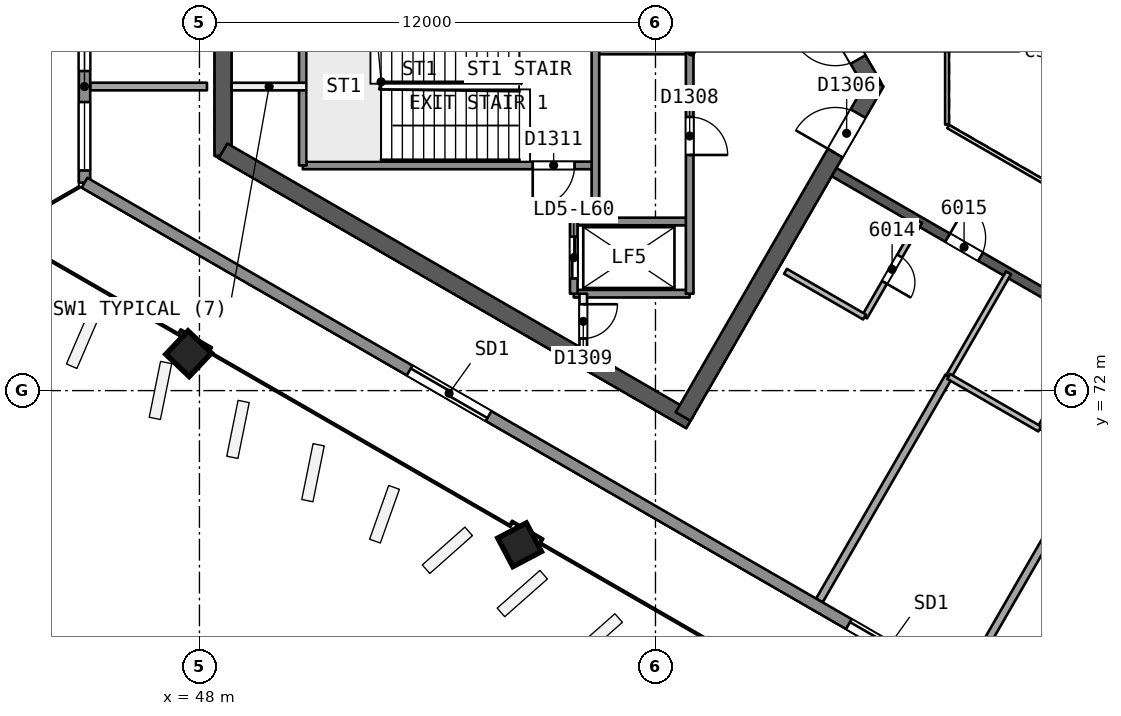
"""IFC4 building model, lengths in metres.
Left out: names, types, materials, properties, quantities, classifications, styles, units other than length and angle.
Written with IfcOpenShell. Run it as: python <this file> out.ifc"""

import sys

from ifc_helpers import new_model, si_unit, direction, frame, frame_2d, origin, origin_2d, place, context, subcontext, project, spatial, rectangle, extrude, element, fill, save


model = new_model("IFC4")
c1 = context("Model", 3, precision=1e-05, world=origin(), true_north=direction((0.0, 1.0)))
c2 = subcontext(c1, "Body", "Model", "MODEL_VIEW")
j1 = project(units=[si_unit("LENGTHUNIT", "METRE"), si_unit("PLANEANGLEUNIT", "RADIAN")], contexts=[c1])
p1 = place(None, origin())
s1 = spatial("IfcSite", under=j1, at=p1, CompositionType="ELEMENT")
p2 = place(p1, origin())
s2 = spatial("IfcBuilding", under=s1, at=p2, CompositionType="ELEMENT")
p3 = place(p2, frame((0.0, 0.0, 242.8)))
s3 = spatial("IfcBuildingStorey", under=s2, at=p3, CompositionType="ELEMENT", Elevation=242.8)
p4 = place(p3, frame((65.74, 80.0, 0.0), z_axis=(0.0, 0.0, 1.0), x_axis=(-0.499991857942, 0.866030104553, 0.0)))
e1 = element("IfcWall", 1, at=p4, inside=s3, PredefinedType="SHEAR", context=c2, shape_type="SweptSolid", body=[
    extrude(rectangle(XDim=10.25, YDim=0.45, at=frame_2d((5.125, 0.0))), origin(), (0.0, 0.0, 1.0), 3.7),
])
p5 = place(p4, frame((0.82, 0.0, 0.0)))
e2 = element("IfcOpeningElement", 2, at=p5, cuts=e1, PredefinedType="OPENING", context=c2, shape_type="SweptSolid", body=[
    extrude(rectangle(XDim=1.2, YDim=2.1, at=frame_2d((0.6, 1.05))), frame((0.0, 0.235, 0.0), z_axis=(0.0, -1.0, 0.0), x_axis=(1.0, 0.0, 0.0)), (0.0, 0.0, 1.0), 0.471),
])
p6 = place(p3, frame((48.622, 81.693, 0.0), z_axis=(0.0, 0.0, 1.0), x_axis=(0.0, -1.0, 0.0)))
e3 = element("IfcWall", 3, at=p6, inside=s3, PredefinedType="SHEAR", context=c2, shape_type="SweptSolid", body=[
    extrude(rectangle(XDim=3.515, YDim=0.45, at=frame_2d((1.758, 0.0))), origin(), (0.0, 0.0, 1.0), 3.7),
])
p7 = place(p3, frame((48.622, 78.307, 0.0), z_axis=(0.0, 0.0, 1.0), x_axis=(0.86602701116, -0.499997215934, 0.0)))
e4 = element("IfcWall", 4, at=p7, inside=s3, PredefinedType="SHEAR", context=c2, shape_type="SweptSolid", body=[
    extrude(rectangle(XDim=14.204, YDim=0.45, at=frame_2d((7.102, 0.0))), origin(), (0.0, 0.0, 1.0), 3.7),
])
p8 = place(p3, frame((60.728, 71.318, 0.0), z_axis=(0.0, 0.0, 1.0), x_axis=(0.500012416173, 0.866018235185, 0.0)))
e5 = element("IfcWall", 5, at=p8, inside=s3, PredefinedType="SHEAR", context=c2, shape_type="SweptSolid", body=[
    extrude(rectangle(XDim=10.155, YDim=0.45, at=frame_2d((5.078, 0.0))), origin(), (0.0, 0.0, 1.0), 3.7),
])
p9 = place(p8, frame((8.005, 0.0, 0.0)))
e6 = element("IfcOpeningElement", 6, at=p9, cuts=e5, PredefinedType="OPENING", context=c2, shape_type="SweptSolid", body=[
    extrude(rectangle(XDim=1.2, YDim=2.1, at=frame_2d((0.6, 1.05))), frame((0.0, 0.235, 0.0), z_axis=(0.0, -1.0, 0.0), x_axis=(1.0, 0.0, 0.0)), (0.0, 0.0, 1.0), 0.471),
])
p10 = place(p3, frame((64.7, 77.748, 0.0), z_axis=(0.0, 0.0, 1.0), x_axis=(0.866026492143, -0.499998114903, 0.0)))
e7 = element("IfcWall", 7, at=p10, inside=s3, PredefinedType="SHEAR", context=c2, shape_type="SweptSolid", body=[
    extrude(rectangle(XDim=15.588, YDim=0.25, at=frame_2d((7.794, 0.0))), origin(), (0.0, 0.0, 1.0), 3.35),
])
p11 = place(p10, frame((3.45, 0.0, 0.0)))
e8 = element("IfcOpeningElement", 8, at=p11, cuts=e7, PredefinedType="OPENING", context=c2, shape_type="SweptSolid", body=[
    extrude(rectangle(XDim=1.0, YDim=2.1, at=frame_2d((0.5, 1.05))), frame((0.0, 0.135, 0.0), z_axis=(0.0, -1.0, 0.0), x_axis=(1.0, 0.0, 0.0)), (0.0, 0.0, 1.0), 0.271),
])
p12 = place(p10, frame((8.315, 0.0, 0.0)))
e9 = element("IfcOpeningElement", 9, at=p12, cuts=e7, PredefinedType="OPENING", context=c2, shape_type="SweptSolid", body=[
    extrude(rectangle(XDim=1.1, YDim=2.1, at=frame_2d((0.55, 1.05))), frame((0.0, 0.135, 0.0), z_axis=(0.0, -1.0, 0.0), x_axis=(1.0, 0.0, 0.0)), (0.0, 0.0, 1.0), 0.271),
])
p13 = place(p10, frame((10.827, 0.0, 0.0)))
e10 = element("IfcOpeningElement", 10, at=p13, cuts=e7, PredefinedType="OPENING", context=c2, shape_type="SweptSolid", body=[
    extrude(rectangle(XDim=1.0, YDim=2.1, at=frame_2d((0.5, 1.05))), frame((0.0, 0.135, 0.0), z_axis=(0.0, -1.0, 0.0), x_axis=(1.0, 0.0, 0.0)), (0.0, 0.0, 1.0), 0.271),
])
p14 = place(p3, frame((47.68, 72.963, 0.0), z_axis=(0.028493212074, 0.006793520471, 0.999570900409), x_axis=(-0.865580919578, 0.50031701382, 0.021273395238)))
e11 = element("IfcColumn", 11, at=p14, inside=s3, PredefinedType="COLUMN", context=c2, shape_type="SweptSolid", body=[
    extrude(rectangle(XDim=0.85, YDim=0.85, at=origin_2d()), origin(), (0.0, 0.0, 1.0), 3.702),
])
p15 = place(p3, frame((56.402, 67.928, 0.0), z_axis=(0.019328516974, 0.012138044789, 0.999739504221), x_axis=(-0.865685889808, 0.500474070789, 0.010660424724)))
e12 = element("IfcColumn", 12, at=p15, inside=s3, PredefinedType="COLUMN", context=c2, shape_type="SweptSolid", body=[
    extrude(rectangle(XDim=0.85, YDim=0.85, at=origin_2d()), origin(), (0.0, 0.0, 1.0), 3.701),
])
p16 = place(p3, frame((45.124, 80.001, 0.0), z_axis=(0.0, 0.0, 1.0), x_axis=(1.0, 0.0, 0.0)))
e13 = element("IfcWall", 13, at=p16, inside=s3, PredefinedType="PARTITIONING", context=c2, shape_type="SweptSolid", body=[
    extrude(rectangle(XDim=3.074, YDim=0.2, at=frame_2d((1.537, 0.0))), origin(), (0.0, 0.0, 1.0), 3.35),
])
p17 = place(p3, frame((66.952, 76.448, 0.0), z_axis=(0.0, 0.0, 1.0), x_axis=(-0.499987231761, -0.866032775405, 0.0)))
e14 = element("IfcWall", 14, at=p17, inside=s3, PredefinedType="PARTITIONING", context=c2, shape_type="SweptSolid", body=[
    extrude(rectangle(XDim=2.9, YDim=0.15, at=frame_2d((1.45, 0.0))), origin(), (0.0, 0.0, 1.0), 3.35),
])
p18 = place(p17, frame((1.05, 0.0, 0.0)))
e15 = element("IfcOpeningElement", 15, at=p18, cuts=e14, PredefinedType="OPENING", context=c2, shape_type="SweptSolid", body=[
    extrude(rectangle(XDim=0.8, YDim=2.1, at=frame_2d((0.4, 1.05))), frame((0.0, 0.085, 0.0), z_axis=(0.0, -1.0, 0.0), x_axis=(1.0, 0.0, 0.0)), (0.0, 0.0, 1.0), 0.171),
])
p19 = place(p3, frame((65.502, 73.937, 0.0), z_axis=(0.0, 0.0, 1.0), x_axis=(-0.865994240961, 0.500053971709, 0.0)))
e16 = element("IfcWall", 16, at=p19, inside=s3, PredefinedType="PARTITIONING", context=c2, shape_type="SweptSolid", body=[
    extrude(rectangle(XDim=2.401, YDim=0.15, at=frame_2d((1.201, 0.0))), origin(), (0.0, 0.0, 1.0), 3.35),
])
p20 = place(p3, frame((64.312, 66.477, 0.0), z_axis=(0.0, 0.0, 1.0), x_axis=(0.500015286268, 0.866016578074, 0.0)))
e17 = element("IfcWall", 17, at=p20, inside=s3, PredefinedType="PARTITIONING", context=c2, shape_type="SweptSolid", body=[
    extrude(rectangle(XDim=6.808, YDim=0.2, at=frame_2d((3.404, 0.0))), origin(), (0.0, 0.0, 1.0), 3.35),
])
p21 = place(p3, frame((67.717, 72.373, 0.0), z_axis=(0.0, 0.0, 1.0), x_axis=(0.500002266011, 0.866024095498, 0.0)))
e18 = element("IfcWall", 18, at=p21, inside=s3, PredefinedType="PARTITIONING", context=c2, shape_type="SweptSolid", body=[
    extrude(rectangle(XDim=3.147, YDim=0.15, at=frame_2d((1.573, 0.0))), origin(), (0.0, 0.0, 1.0), 3.35),
])
p22 = place(p3, frame((71.684, 73.716, 0.0), z_axis=(0.0, 0.0, 1.0), x_axis=(-0.499977671647, -0.866038294681, 0.0)))
e19 = element("IfcWall", 19, at=p22, inside=s3, PredefinedType="PARTITIONING", context=c2, shape_type="SweptSolid", body=[
    extrude(rectangle(XDim=3.147, YDim=0.15, at=frame_2d((1.573, 0.0))), origin(), (0.0, 0.0, 1.0), 3.35),
])
p23 = place(p22, frame((1.123, 0.0, 0.0)))
e20 = element("IfcOpeningElement", 20, at=p23, cuts=e19, PredefinedType="OPENING", context=c2, shape_type="SweptSolid", body=[
    extrude(rectangle(XDim=0.9, YDim=2.1, at=frame_2d((0.45, 1.05))), frame((0.0, 0.085, 0.0), z_axis=(0.0, -1.0, 0.0), x_axis=(1.0, 0.0, 0.0)), (0.0, 0.0, 1.0), 0.171),
])
p24 = place(p3, frame((70.111, 70.991, 0.0), z_axis=(0.0, 0.0, 1.0), x_axis=(-0.866050310653, 0.499956857557, 0.0)))
e21 = element("IfcWall", 21, at=p24, inside=s3, PredefinedType="PARTITIONING", context=c2, shape_type="SweptSolid", body=[
    extrude(rectangle(XDim=2.765, YDim=0.15, at=frame_2d((1.382, 0.0))), origin(), (0.0, 0.0, 1.0), 3.35),
])
p25 = place(p3, frame((68.093, 64.295, 0.0), z_axis=(0.0, 0.0, 1.0), x_axis=(0.500011170278, 0.866018954525, 0.0)))
e22 = element("IfcWall", 22, at=p25, inside=s3, PredefinedType="PARTITIONING", context=c2, shape_type="SweptSolid", body=[
    extrude(rectangle(XDim=9.955, YDim=0.2, at=frame_2d((4.978, 0.0))), origin(), (0.0, 0.0, 1.0), 3.35),
])
p26 = place(p3, frame((44.975, 77.469, 0.0), z_axis=(0.0, 0.0, 1.0), x_axis=(0.0, 1.0, 0.0)))
e23 = element("IfcWall", 23, at=p26, inside=s3, PredefinedType="SOLIDWALL", context=c2, shape_type="SweptSolid", body=[
    extrude(rectangle(XDim=5.061, YDim=0.3, at=frame_2d((2.531, 0.0))), origin(), (0.0, 0.0, 1.0), 3.35),
])
p27 = place(p26, frame((2.938, 0.0, 0.9)))
e24 = element("IfcOpeningElement", 24, at=p27, cuts=e23, PredefinedType="OPENING", context=c2, shape_type="SweptSolid", body=[
    extrude(rectangle(XDim=1.8, YDim=1.5, at=frame_2d((0.9, 0.75))), frame((0.0, 0.161, 0.0), z_axis=(0.0, -1.0, 0.0), x_axis=(1.0, 0.0, 0.0)), (0.0, 0.0, 1.0), 0.321),
])
p28 = place(p26, frame((0.323, 0.0, 0.9)))
e25 = element("IfcOpeningElement", 25, at=p28, cuts=e23, PredefinedType="OPENING", context=c2, shape_type="SweptSolid", body=[
    extrude(rectangle(XDim=1.8, YDim=1.5, at=frame_2d((0.9, 0.75))), frame((0.0, 0.161, 0.0), z_axis=(0.0, -1.0, 0.0), x_axis=(1.0, 0.0, 0.0)), (0.0, 0.0, 1.0), 0.321),
])
p29 = place(p3, frame((87.821, 52.733, 0.0), z_axis=(0.0, 0.0, 1.0), x_axis=(-0.866025586464, 0.49999968359, 0.0)))
e26 = element("IfcWall", 26, at=p29, inside=s3, PredefinedType="SOLIDWALL", context=c2, shape_type="SweptSolid", body=[
    extrude(rectangle(XDim=49.474, YDim=0.3, at=frame_2d((24.737, 0.0))), origin(), (0.0, 0.0, 1.0), 3.35),
])
p30 = place(p29, frame((23.849, 0.0, 0.0)))
e27 = element("IfcOpeningElement", 27, at=p30, cuts=e26, PredefinedType="OPENING", context=c2, shape_type="SweptSolid", body=[
    extrude(rectangle(XDim=2.4, YDim=2.4, at=frame_2d((1.2, 1.2))), frame((0.0, 0.161, 0.0), z_axis=(0.0, -1.0, 0.0), x_axis=(1.0, 0.0, 0.0)), (0.0, 0.0, 1.0), 0.321),
])
p31 = place(p29, frame((37.196, 0.0, 0.0)))
e28 = element("IfcOpeningElement", 28, at=p31, cuts=e26, PredefinedType="OPENING", context=c2, shape_type="SweptSolid", body=[
    extrude(rectangle(XDim=2.4, YDim=2.4, at=frame_2d((1.2, 1.2))), frame((0.0, 0.161, 0.0), z_axis=(0.0, -1.0, 0.0), x_axis=(1.0, 0.0, 0.0)), (0.0, 0.0, 1.0), 0.321),
])
p32 = place(p29, frame((10.19, 0.0, 0.0)))
e29 = element("IfcOpeningElement", 29, at=p32, cuts=e26, PredefinedType="OPENING", context=c2, shape_type="SweptSolid", body=[
    extrude(rectangle(XDim=2.4, YDim=2.4, at=frame_2d((1.2, 1.2))), frame((0.0, 0.161, 0.0), z_axis=(0.0, -1.0, 0.0), x_axis=(1.0, 0.0, 0.0)), (0.0, 0.0, 1.0), 0.321),
])
p33 = place(p3, frame((60.9, 80.95, 0.0), z_axis=(0.0, 0.0, 1.0), x_axis=(-1.0, 0.0, 0.0)))
e30 = element("IfcWall", 30, at=p33, inside=s3, PredefinedType="SOLIDWALL", context=c2, shape_type="SweptSolid", body=[
    extrude(rectangle(XDim=2.48, YDim=0.2, at=frame_2d((1.24, 0.0))), origin(), (0.0, 0.0, 1.0), 3.35),
])
p34 = place(p3, frame((50.82, 80.0, 0.0), z_axis=(0.0, 0.0, 1.0), x_axis=(-1.0, 0.0, 0.0)))
e31 = element("IfcWall", 31, at=p34, inside=s3, PredefinedType="PARTITIONING", context=c2, shape_type="SweptSolid", body=[
    extrude(rectangle(XDim=1.973, YDim=0.2, at=frame_2d((0.987, 0.0))), origin(), (0.0, 0.0, 1.0), 3.35),
])
p35 = place(p3, frame((58.42, 77.925, 0.0), z_axis=(0.0, 0.0, 1.0), x_axis=(-1.0, 0.0, 0.0)))
e32 = element("IfcWall", 32, at=p35, inside=s3, PredefinedType="SOLIDWALL", context=c2, shape_type="SweptSolid", body=[
    extrude(rectangle(XDim=7.7, YDim=0.2, at=frame_2d((3.85, 0.0))), origin(), (0.0, 0.0, 1.0), 3.35),
])
p36 = place(p35, frame((0.55, 0.0, 0.0)))
e33 = element("IfcOpeningElement", 33, at=p36, cuts=e32, PredefinedType="OPENING", context=c2, shape_type="SweptSolid", body=[
    extrude(rectangle(XDim=1.1, YDim=2.1, at=frame_2d((0.55, 1.05))), frame((0.0, 0.11, 0.0), z_axis=(0.0, -1.0, 0.0), x_axis=(1.0, 0.0, 0.0)), (0.0, 0.0, 1.0), 0.221),
])
for number, where, z_axis, x_axis in (
    (34, (60.9, 76.45, 0.0), (0.0, 0.0, 1.0), (-1.0, 0.0, 0.0)),
    (35, (60.9, 74.55, 0.0), (0.0, 0.0, 1.0), (-1.0, 0.0, 0.0)),
):
    element("IfcWall", number, at=place(p3, frame(where, z_axis=z_axis, x_axis=x_axis)), inside=s3, PredefinedType="SOLIDWALL", context=c2, shape_type="SweptSolid", body=[
        extrude(rectangle(XDim=3.05, YDim=0.2, at=frame_2d((1.525, 0.0))), origin(), (0.0, 0.0, 1.0), 3.35),
    ])
p37 = place(p3, frame((60.9, 85.45, 0.0), z_axis=(0.0, 0.0, 1.0), x_axis=(0.0, -1.0, 0.0)))
e36 = element("IfcWall", 36, at=p37, inside=s3, PredefinedType="SOLIDWALL", context=c2, shape_type="SweptSolid", body=[
    extrude(rectangle(XDim=10.9, YDim=0.2, at=frame_2d((5.45, 0.0))), origin(), (0.0, 0.0, 1.0), 3.35),
])
p38 = place(p37, frame((1.75, 0.0, 0.0)))
e37 = element("IfcOpeningElement", 37, at=p38, cuts=e36, PredefinedType="OPENING", context=c2, shape_type="SweptSolid", body=[
    extrude(rectangle(XDim=1.0, YDim=2.1, at=frame_2d((0.5, 1.05))), frame((0.0, 0.11, 0.0), z_axis=(0.0, -1.0, 0.0), x_axis=(1.0, 0.0, 0.0)), (0.0, 0.0, 1.0), 0.221),
])
p39 = place(p37, frame((6.25, 0.0, 0.0)))
e38 = element("IfcOpeningElement", 38, at=p39, cuts=e36, PredefinedType="OPENING", context=c2, shape_type="SweptSolid", body=[
    extrude(rectangle(XDim=1.0, YDim=2.1, at=frame_2d((0.5, 1.05))), frame((0.0, 0.11, 0.0), z_axis=(0.0, -1.0, 0.0), x_axis=(1.0, 0.0, 0.0)), (0.0, 0.0, 1.0), 0.221),
])
p40 = place(p3, frame((58.42, 87.09, 0.0), z_axis=(0.0, 0.0, 1.0), x_axis=(0.0, -1.0, 0.0)))
e39 = element("IfcWall", 39, at=p40, inside=s3, PredefinedType="SOLIDWALL", context=c2, shape_type="SweptSolid", body=[
    extrude(rectangle(XDim=10.64, YDim=0.2, at=frame_2d((5.32, 0.0))), origin(), (0.0, 0.0, 1.0), 3.35),
])
p41 = place(p40, frame((0.37, 0.0, 0.0)))
e40 = element("IfcOpeningElement", 40, at=p41, cuts=e39, PredefinedType="OPENING", context=c2, shape_type="SweptSolid", body=[
    extrude(rectangle(XDim=0.9, YDim=2.1, at=frame_2d((0.45, 1.05))), frame((0.0, 0.11, 0.0), z_axis=(0.0, -1.0, 0.0), x_axis=(1.0, 0.0, 0.0)), (0.0, 0.0, 1.0), 0.221),
])
p42 = place(p3, frame((58.1, 74.55, 0.0), z_axis=(0.0, 0.0, 1.0), x_axis=(0.0, -1.0, 0.0)))
e41 = element("IfcWall", 41, at=p42, inside=s3, PredefinedType="PARTITIONING", context=c2, shape_type="SweptSolid", body=[
    extrude(rectangle(XDim=1.455, YDim=0.2, at=frame_2d((0.728, 0.0))), origin(), (0.0, 0.0, 1.0), 3.35),
])
p43 = place(p42, frame((0.278, 0.0, 0.0)))
e42 = element("IfcOpeningElement", 42, at=p43, cuts=e41, PredefinedType="OPENING", context=c2, shape_type="SweptSolid", body=[
    extrude(rectangle(XDim=0.9, YDim=2.1, at=frame_2d((0.45, 1.05))), frame((0.0, 0.11, 0.0), z_axis=(0.0, -1.0, 0.0), x_axis=(1.0, 0.0, 0.0)), (0.0, 0.0, 1.0), 0.221),
])
p44 = place(p3, frame((57.85, 76.45, 0.0), z_axis=(0.0, 0.0, 1.0), x_axis=(0.0, -1.0, 0.0)))
e43 = element("IfcWall", 43, at=p44, inside=s3, PredefinedType="SOLIDWALL", context=c2, shape_type="SweptSolid", body=[
    extrude(rectangle(XDim=1.9, YDim=0.2, at=frame_2d((0.95, 0.0))), origin(), (0.0, 0.0, 1.0), 3.35),
])
p45 = place(p44, frame((0.4, 0.0, 0.0)))
e44 = element("IfcOpeningElement", 44, at=p45, cuts=e43, PredefinedType="OPENING", context=c2, shape_type="SweptSolid", body=[
    extrude(rectangle(XDim=1.1, YDim=2.1, at=frame_2d((0.55, 1.05))), frame((0.0, 0.11, 0.0), z_axis=(0.0, -1.0, 0.0), x_axis=(1.0, 0.0, 0.0)), (0.0, 0.0, 1.0), 0.221),
])
p46 = place(p3, frame((50.72, 82.075, 0.0), z_axis=(0.0, 0.0, 1.0), x_axis=(0.0, -1.0, 0.0)))
e45 = element("IfcWall", 45, at=p46, inside=s3, PredefinedType="SOLIDWALL", context=c2, shape_type="SweptSolid", body=[
    extrude(rectangle(XDim=4.15, YDim=0.2, at=frame_2d((2.075, 0.0))), origin(), (0.0, 0.0, 1.0), 3.35),
])
p47 = place(p3, frame((67.672, 81.0, 0.0), z_axis=(0.0, 0.0, 1.0), x_axis=(0.0, -1.0, 0.0)))
e46 = element("IfcWall", 46, at=p47, inside=s3, PredefinedType="PARTITIONING", context=c2, shape_type="SweptSolid", body=[
    extrude(rectangle(XDim=2.0, YDim=0.1, at=frame_2d((1.0, 0.0))), origin(), (0.0, 0.0, 1.0), 3.35),
])
p48 = place(p3, frame((67.702, 78.948, 0.0), z_axis=(0.0, 0.0, 1.0), x_axis=(0.866026658274, -0.499997827154, 0.0)))
e47 = element("IfcWall", 47, at=p48, inside=s3, PredefinedType="PARTITIONING", context=c2, shape_type="SweptSolid", body=[
    extrude(rectangle(XDim=11.588, YDim=0.1, at=frame_2d((5.794, 0.0))), origin(), (0.0, 0.0, 1.0), 3.35),
])
p49 = place(p18, origin())
e48 = element("IfcDoor", 48, at=p49, inside=s3, OperationType="SINGLE_SWING_RIGHT", PredefinedType="NOTDEFINED", context=c2, shape_type="SweptSolid", body=[
    extrude(rectangle(XDim=0.8, YDim=2.1, at=frame_2d((0.4, 1.05))), frame((0.0, 0.025, 0.0), z_axis=(0.0, -1.0, 0.0), x_axis=(1.0, 0.0, 0.0)), (0.0, 0.0, 1.0), 0.05),
])
fill(e15, e48)
p50 = place(p11, origin())
e49 = element("IfcDoor", 49, at=p50, inside=s3, OperationType="SINGLE_SWING_LEFT", PredefinedType="NOTDEFINED", context=c2, shape_type="SweptSolid", body=[
    extrude(rectangle(XDim=1.0, YDim=2.1, at=frame_2d((0.5, 1.05))), frame((0.0, 0.025, 0.0), z_axis=(0.0, -1.0, 0.0), x_axis=(1.0, 0.0, 0.0)), (0.0, 0.0, 1.0), 0.05),
])
fill(e8, e49)
p51 = place(p27, origin())
e50 = element("IfcWindow", 50, at=p51, inside=s3, PartitioningType="SINGLE_PANEL", PredefinedType="WINDOW", context=c2, shape_type="SweptSolid", body=[
    extrude(rectangle(XDim=1.8, YDim=1.5, at=frame_2d((0.9, 0.75))), frame((0.0, 0.03, 0.0), z_axis=(0.0, -1.0, 0.0), x_axis=(1.0, 0.0, 0.0)), (0.0, 0.0, 1.0), 0.06),
])
fill(e24, e50)
p52 = place(p28, origin())
e51 = element("IfcWindow", 51, at=p52, inside=s3, PartitioningType="SINGLE_PANEL", PredefinedType="WINDOW", context=c2, shape_type="SweptSolid", body=[
    extrude(rectangle(XDim=1.8, YDim=1.5, at=frame_2d((0.9, 0.75))), frame((0.0, 0.03, 0.0), z_axis=(0.0, -1.0, 0.0), x_axis=(1.0, 0.0, 0.0)), (0.0, 0.0, 1.0), 0.06),
])
fill(e25, e51)
p53 = place(p30, origin())
e52 = element("IfcDoor", 52, at=p53, inside=s3, OperationType="SLIDING_TO_LEFT", PredefinedType="NOTDEFINED", context=c2, shape_type="SweptSolid", body=[
    extrude(rectangle(XDim=2.4, YDim=2.4, at=frame_2d((1.2, 1.2))), frame((0.0, 0.025, 0.0), z_axis=(0.0, -1.0, 0.0), x_axis=(1.0, 0.0, 0.0)), (0.0, 0.0, 1.0), 0.05),
])
fill(e27, e52)
p54 = place(p31, origin())
e53 = element("IfcDoor", 53, at=p54, inside=s3, OperationType="SLIDING_TO_RIGHT", PredefinedType="NOTDEFINED", context=c2, shape_type="SweptSolid", body=[
    extrude(rectangle(XDim=2.4, YDim=2.4, at=frame_2d((1.2, 1.2))), frame((0.0, 0.025, 0.0), z_axis=(0.0, -1.0, 0.0), x_axis=(1.0, 0.0, 0.0)), (0.0, 0.0, 1.0), 0.05),
])
fill(e28, e53)
p55 = place(p5, origin())
e54 = element("IfcDoor", 54, at=p55, inside=s3, OperationType="SINGLE_SWING_RIGHT", PredefinedType="NOTDEFINED", context=c2, shape_type="SweptSolid", body=[
    extrude(rectangle(XDim=1.2, YDim=2.1, at=frame_2d((0.6, 1.05))), frame((0.0, 0.025, 0.0), z_axis=(0.0, -1.0, 0.0), x_axis=(1.0, 0.0, 0.0)), (0.0, 0.0, 1.0), 0.05),
])
fill(e2, e54)
p56 = place(p9, origin())
e55 = element("IfcDoor", 55, at=p56, inside=s3, OperationType="SINGLE_SWING_LEFT", PredefinedType="NOTDEFINED", context=c2, shape_type="SweptSolid", body=[
    extrude(rectangle(XDim=1.2, YDim=2.1, at=frame_2d((0.6, 1.05))), frame((0.0, 0.025, 0.0), z_axis=(0.0, -1.0, 0.0), x_axis=(1.0, 0.0, 0.0)), (0.0, 0.0, 1.0), 0.05),
])
fill(e6, e55)
p57 = place(p45, origin())
e56 = element("IfcDoor", 56, at=p57, inside=s3, OperationType="SLIDING_TO_RIGHT", PredefinedType="NOTDEFINED", context=c2, shape_type="SweptSolid", body=[
    extrude(rectangle(XDim=1.1, YDim=2.1, at=frame_2d((0.55, 1.05))), frame((0.0, 0.025, 0.0), z_axis=(0.0, -1.0, 0.0), x_axis=(1.0, 0.0, 0.0)), (0.0, 0.0, 1.0), 0.05),
])
fill(e44, e56)
p58 = place(p39, origin())
e57 = element("IfcDoor", 57, at=p58, inside=s3, OperationType="SINGLE_SWING_RIGHT", PredefinedType="NOTDEFINED", context=c2, shape_type="SweptSolid", body=[
    extrude(rectangle(XDim=1.0, YDim=2.1, at=frame_2d((0.5, 1.05))), frame((0.0, 0.025, 0.0), z_axis=(0.0, -1.0, 0.0), x_axis=(1.0, 0.0, 0.0)), (0.0, 0.0, 1.0), 0.05),
])
fill(e38, e57)
p59 = place(p43, origin())
e58 = element("IfcDoor", 58, at=p59, inside=s3, OperationType="SINGLE_SWING_LEFT", PredefinedType="NOTDEFINED", context=c2, shape_type="SweptSolid", body=[
    extrude(rectangle(XDim=0.9, YDim=2.1, at=frame_2d((0.45, 1.05))), frame((0.0, 0.025, 0.0), z_axis=(0.0, -1.0, 0.0), x_axis=(1.0, 0.0, 0.0)), (0.0, 0.0, 1.0), 0.05),
])
fill(e42, e58)
p60 = place(p36, origin())
e59 = element("IfcDoor", 59, at=p60, inside=s3, OperationType="SINGLE_SWING_RIGHT", PredefinedType="NOTDEFINED", context=c2, shape_type="SweptSolid", body=[
    extrude(rectangle(XDim=1.1, YDim=2.1, at=frame_2d((0.55, 1.05))), frame((0.0, 0.025, 0.0), z_axis=(0.0, -1.0, 0.0), x_axis=(1.0, 0.0, 0.0)), (0.0, 0.0, 1.0), 0.05),
])
fill(e33, e59)
save(model, sys.argv[1])
